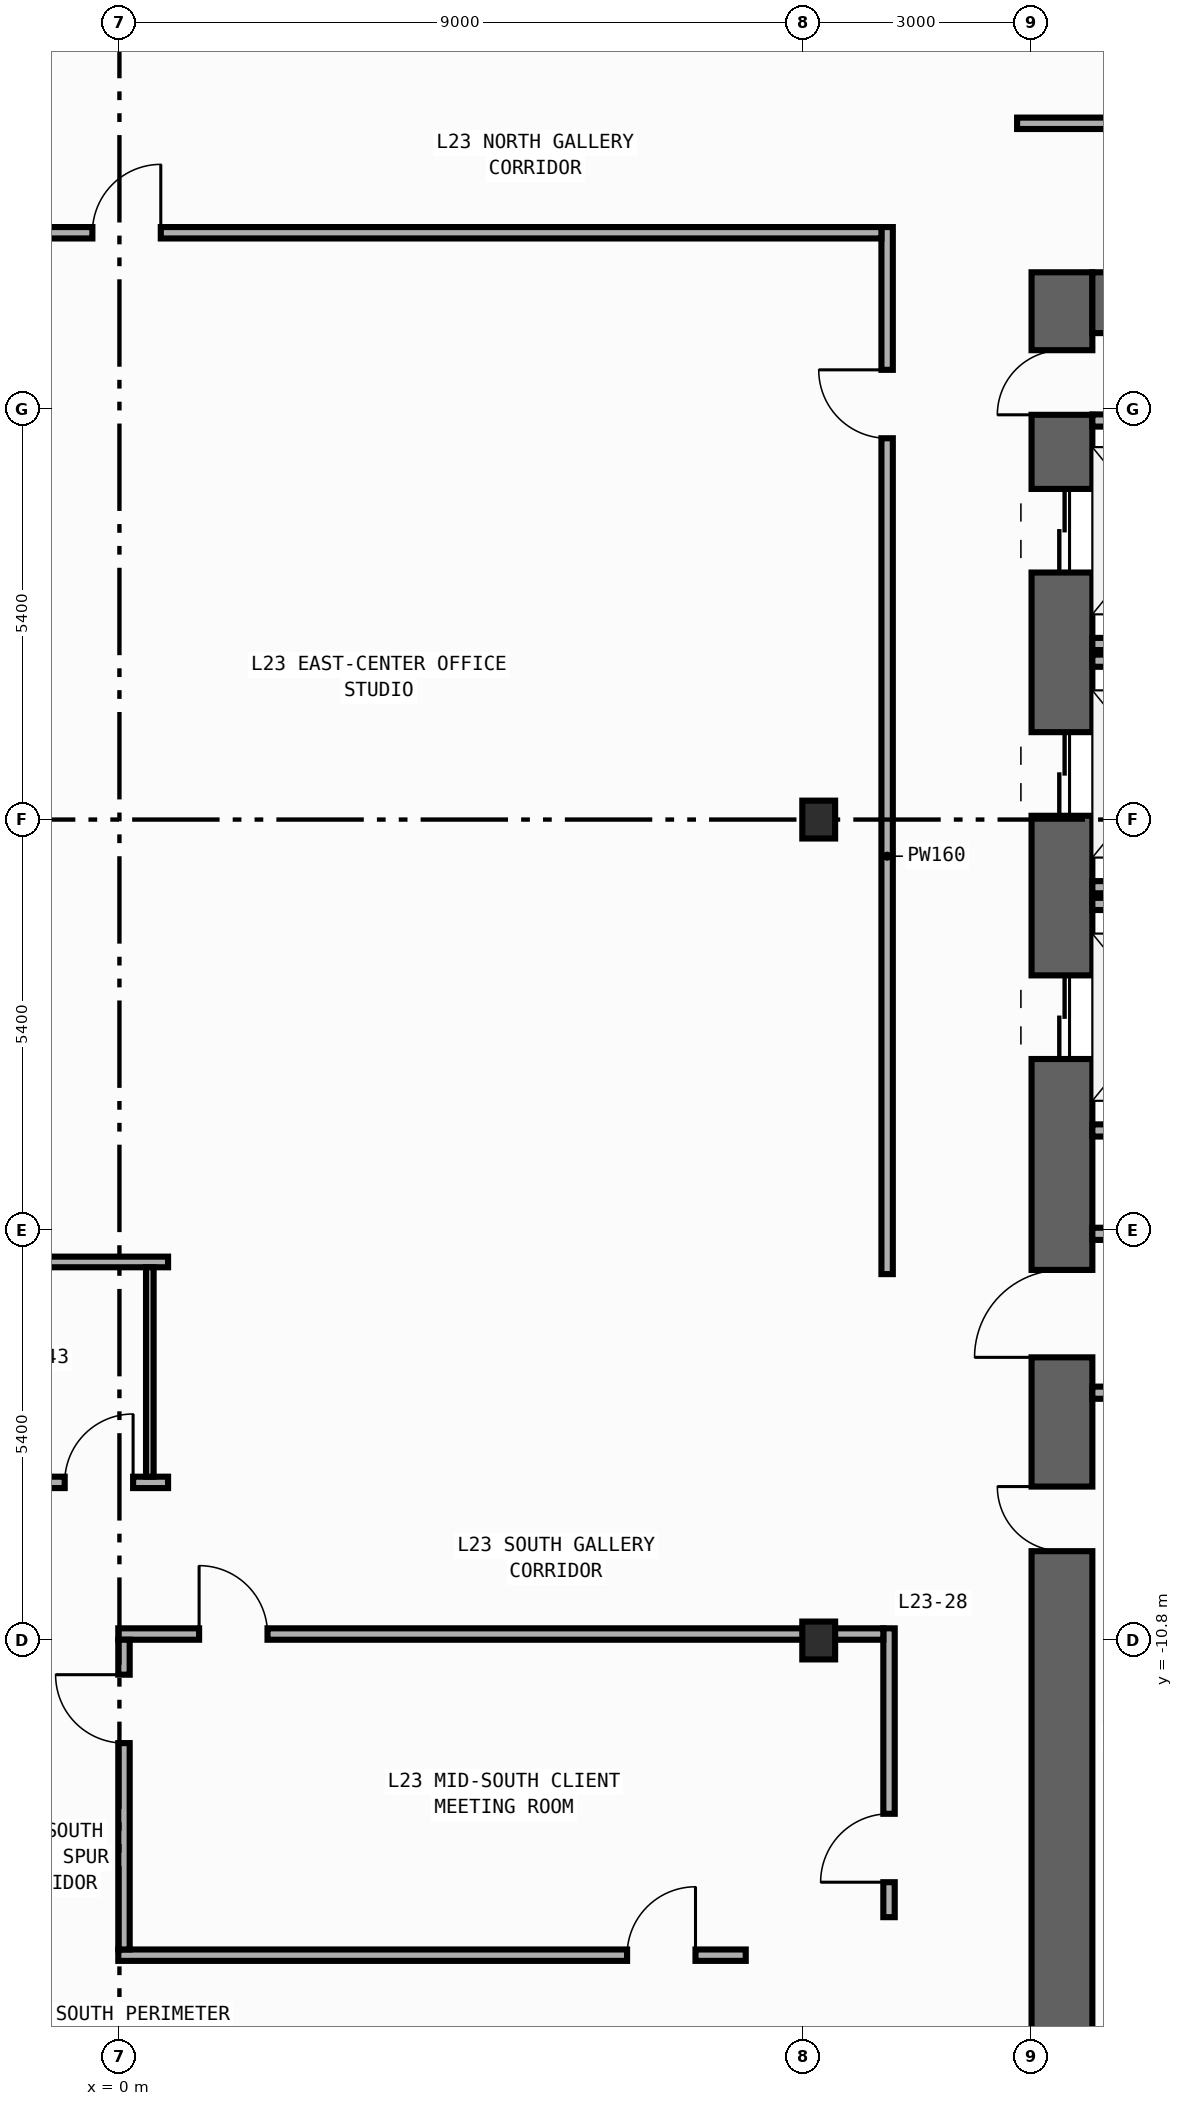
"""IFC4 building model, lengths in metres.
Left out: names, types, materials, properties, quantities, classifications, styles, units other than length and angle.
Written with IfcOpenShell. Run it as: python <this file> out.ifc"""

import sys

from ifc_helpers import new_model, si_unit, direction, frame, frame_2d, origin, origin_2d, place, context, subcontext, project, spatial, rectangle, i_section, extrude, element, fill, save


model = new_model("IFC4")
c1 = context("Model", 3, precision=1e-05, world=origin(), true_north=direction((0.0, 1.0)))
c2 = subcontext(c1, "Body", "Model", "MODEL_VIEW")
j1 = project(units=[si_unit("LENGTHUNIT", "METRE"), si_unit("PLANEANGLEUNIT", "RADIAN")], contexts=[c1])
p1 = place(None, origin())
s1 = spatial("IfcSite", under=j1, at=p1, CompositionType="ELEMENT")
p2 = place(p1, origin())
s2 = spatial("IfcBuilding", under=s1, at=p2, CompositionType="ELEMENT")
p3 = place(p2, frame((0.0, 0.0, 101.6)))
s3 = spatial("IfcBuildingStorey", under=s2, at=p3, CompositionType="ELEMENT", Elevation=101.6)
p4 = place(p3, frame((12.4, -19.8, 0.0), z_axis=(0.0, 0.0, 1.0), x_axis=(0.0, 1.0, 0.0)))
e1 = element("IfcWall", 1, at=p4, inside=s3, PredefinedType="SHEAR", context=c2, shape_type="SweptSolid", body=[
    extrude(rectangle(XDim=27.0, YDim=0.8, at=frame_2d((13.5, 0.0))), origin(), (0.0, 0.0, 1.0), 3.94),
])
p5 = place(p4, frame((23.05, 0.0, 0.0)))
e2 = element("IfcOpeningElement", 2, at=p5, cuts=e1, PredefinedType="OPENING", context=c2, shape_type="SweptSolid", body=[
    extrude(rectangle(XDim=1.1, YDim=2.2, at=frame_2d((0.55, 1.1))), frame((0.0, 0.41, 0.0), z_axis=(0.0, -1.0, 0.0), x_axis=(1.0, 0.0, 0.0)), (0.0, 0.0, 1.0), 0.82),
])
p6 = place(p4, frame((19.85, 0.0, 0.0)))
e3 = element("IfcOpeningElement", 3, at=p6, cuts=e1, PredefinedType="OPENING", context=c2, shape_type="SweptSolid", body=[
    extrude(rectangle(XDim=1.1, YDim=2.2, at=frame_2d((0.55, 1.1))), frame((0.0, 0.41, 0.0), z_axis=(0.0, -1.0, 0.0), x_axis=(1.0, 0.0, 0.0)), (0.0, 0.0, 1.0), 0.82),
])
p7 = place(p4, frame((16.65, 0.0, 0.0)))
e4 = element("IfcOpeningElement", 4, at=p7, cuts=e1, PredefinedType="OPENING", context=c2, shape_type="SweptSolid", body=[
    extrude(rectangle(XDim=1.1, YDim=2.2, at=frame_2d((0.55, 1.1))), frame((0.0, 0.41, 0.0), z_axis=(0.0, -1.0, 0.0), x_axis=(1.0, 0.0, 0.0)), (0.0, 0.0, 1.0), 0.82),
])
p8 = place(p4, frame((10.175, 0.0, 0.0)))
e5 = element("IfcOpeningElement", 5, at=p8, cuts=e1, PredefinedType="OPENING", context=c2, shape_type="SweptSolid", body=[
    extrude(rectangle(XDim=0.85, YDim=2.1, at=frame_2d((0.425, 1.05))), frame((0.0, 0.41, 0.0), z_axis=(0.0, -1.0, 0.0), x_axis=(1.0, 0.0, 0.0)), (0.0, 0.0, 1.0), 0.82),
])
p9 = place(p4, frame((12.725, 0.0, 0.0)))
e6 = element("IfcOpeningElement", 6, at=p9, cuts=e1, PredefinedType="OPENING", context=c2, shape_type="SweptSolid", body=[
    extrude(rectangle(XDim=1.15, YDim=2.2, at=frame_2d((0.575, 1.1))), frame((0.0, 0.41, 0.0), z_axis=(0.0, -1.0, 0.0), x_axis=(1.0, 0.0, 0.0)), (0.0, 0.0, 1.0), 0.82),
])
p10 = place(p4, frame((25.125, 0.0, 0.0)))
e7 = element("IfcOpeningElement", 7, at=p10, cuts=e1, PredefinedType="OPENING", context=c2, shape_type="SweptSolid", body=[
    extrude(rectangle(XDim=0.85, YDim=2.1, at=frame_2d((0.425, 1.05))), frame((0.0, 0.41, 0.0), z_axis=(0.0, -1.0, 0.0), x_axis=(1.0, 0.0, 0.0)), (0.0, 0.0, 1.0), 0.82),
])
p11 = place(p3, frame((12.8, 6.8, 0.0), z_axis=(0.0, 0.0, 1.0), x_axis=(1.0, 0.0, 0.0)))
e8 = element("IfcWall", 8, at=p11, inside=s3, PredefinedType="SHEAR", context=c2, shape_type="SweptSolid", body=[
    extrude(rectangle(XDim=6.8, YDim=0.8, at=frame_2d((3.4, 0.0))), origin(), (0.0, 0.0, 1.0), 3.94),
])
for number, where, z_axis, x_axis in (
    (9, (9.2, -10.8, 0.0), (0.0, 0.0, 1.0), (1.0, 0.0, 0.0)),
    (10, (9.2, 0.0, 0.0), (0.0, 0.0, 1.0), (1.0, 0.0, 0.0)),
):
    element("IfcColumn", number, at=place(p3, frame(where, z_axis=z_axis, x_axis=x_axis)), inside=s3, PredefinedType="COLUMN", context=c2, shape_type="SweptSolid", body=[
        extrude(i_section(OverallWidth=0.432, OverallDepth=0.498, WebThickness=0.045, FlangeThickness=0.07, FilletRadius=0.022, at=origin_2d()), origin(), (0.0, 0.0, 1.0), 4.2),
    ])
for number, where, z_axis, x_axis in (
    (11, (12.8, 2.31, 0.0), (0.0, 0.0, 1.0), (1.0, 0.0, 0.0)),
    (12, (12.8, -0.89, 0.0), (0.0, 0.0, 1.0), (1.0, 0.0, 0.0)),
    (13, (12.8, 2.09, 0.0), (0.0, 0.0, 1.0), (1.0, 0.0, 0.0)),
    (14, (12.8, -4.09, 0.0), (0.0, 0.0, 1.0), (1.0, 0.0, 0.0)),
    (15, (12.8, -1.11, 0.0), (0.0, 0.0, 1.0), (1.0, 0.0, 0.0)),
):
    element("IfcWall", number, at=place(p3, frame(where, z_axis=z_axis, x_axis=x_axis)), inside=s3, PredefinedType="STANDARD", context=c2, shape_type="SweptSolid", body=[
        extrude(rectangle(XDim=2.19, YDim=0.16, at=frame_2d((1.095, 0.0))), origin(), (0.0, 0.0, 1.0), 3.94),
    ])
for number, where, z_axis, x_axis in (
    (16, (12.8, -5.45, 0.0), (0.0, 0.0, 1.0), (1.0, 0.0, 0.0)),
    (17, (12.8, -7.54, 0.0), (0.0, 0.0, 1.0), (1.0, 0.0, 0.0)),
    (18, (12.8, 5.25, 0.0), (0.0, 0.0, 1.0), (1.0, 0.0, 0.0)),
):
    element("IfcWall", number, at=place(p3, frame(where, z_axis=z_axis, x_axis=x_axis)), inside=s3, PredefinedType="STANDARD", context=c2, shape_type="SweptSolid", body=[
        extrude(rectangle(XDim=2.6, YDim=0.16, at=frame_2d((1.3, 0.0))), origin(), (0.0, 0.0, 1.0), 3.94),
    ])
p12 = place(p3, frame((10.1, -5.98, 0.0), z_axis=(0.0, 0.0, 1.0), x_axis=(0.0, 1.0, 0.0)))
e19 = element("IfcWall", 19, at=p12, inside=s3, PredefinedType="PARTITIONING", context=c2, shape_type="SweptSolid", body=[
    extrude(rectangle(XDim=13.775, YDim=0.15, at=frame_2d((6.887, 0.0))), origin(), (0.0, 0.0, 1.0), 3.94),
])
p13 = place(p12, frame((10.997, 0.0, 0.0)))
e20 = element("IfcOpeningElement", 20, at=p13, cuts=e19, PredefinedType="OPENING", context=c2, shape_type="SweptSolid", body=[
    extrude(rectangle(XDim=0.9, YDim=2.15, at=frame_2d((0.45, 1.075))), frame((0.0, 0.085, 0.0), z_axis=(0.0, -1.0, 0.0), x_axis=(1.0, 0.0, 0.0)), (0.0, 0.0, 1.0), 0.17),
])
p14 = place(p3, frame((10.125, -14.44, 0.0), z_axis=(0.0, 0.0, 1.0), x_axis=(0.0, 1.0, 0.0)))
e21 = element("IfcWall", 21, at=p14, inside=s3, PredefinedType="PARTITIONING", context=c2, shape_type="SweptSolid", body=[
    extrude(rectangle(XDim=3.8, YDim=0.15, at=frame_2d((1.9, 0.0))), origin(), (0.0, 0.0, 1.0), 3.94),
])
p15 = place(p14, frame((0.46, 0.0, 0.0)))
e22 = element("IfcOpeningElement", 22, at=p15, cuts=e21, PredefinedType="OPENING", context=c2, shape_type="SweptSolid", body=[
    extrude(rectangle(XDim=0.9, YDim=2.15, at=frame_2d((0.45, 1.075))), frame((0.0, 0.085, 0.0), z_axis=(0.0, -1.0, 0.0), x_axis=(1.0, 0.0, 0.0)), (0.0, 0.0, 1.0), 0.17),
])
p16 = place(p3, frame((-2.62, 7.72, 0.0), z_axis=(0.0, 0.0, 1.0), x_axis=(1.0, 0.0, 0.0)))
e23 = element("IfcWall", 23, at=p16, inside=s3, PredefinedType="PARTITIONING", context=c2, shape_type="SweptSolid", body=[
    extrude(rectangle(XDim=12.645, YDim=0.15, at=frame_2d((6.323, 0.0))), origin(), (0.0, 0.0, 1.0), 3.94),
])
p17 = place(p16, frame((2.264, 0.0, 0.0)))
e24 = element("IfcOpeningElement", 24, at=p17, cuts=e23, PredefinedType="OPENING", context=c2, shape_type="SweptSolid", body=[
    extrude(rectangle(XDim=0.9, YDim=2.15, at=frame_2d((0.45, 1.075))), frame((0.0, 0.085, 0.0), z_axis=(0.0, -1.0, 0.0), x_axis=(1.0, 0.0, 0.0)), (0.0, 0.0, 1.0), 0.17),
])
p18 = place(p3, frame((-2.62, -8.72, 0.0), z_axis=(0.0, 0.0, 1.0), x_axis=(1.0, 0.0, 0.0)))
e25 = element("IfcWall", 25, at=p18, inside=s3, PredefinedType="PARTITIONING", context=c2, shape_type="SweptSolid", body=[
    extrude(rectangle(XDim=3.26, YDim=0.15, at=frame_2d((1.63, 0.0))), origin(), (0.0, 0.0, 1.0), 3.94),
])
p19 = place(p18, frame((1.9, 0.0, 0.0)))
e26 = element("IfcOpeningElement", 26, at=p19, cuts=e25, PredefinedType="OPENING", context=c2, shape_type="SweptSolid", body=[
    extrude(rectangle(XDim=0.9, YDim=2.15, at=frame_2d((0.45, 1.075))), frame((0.0, 0.085, 0.0), z_axis=(0.0, -1.0, 0.0), x_axis=(1.0, 0.0, 0.0)), (0.0, 0.0, 1.0), 0.17),
])
p20 = place(p3, frame((-0.015, -10.715, 0.0), z_axis=(0.0, 0.0, 1.0), x_axis=(1.0, 0.0, 0.0)))
e27 = element("IfcWall", 27, at=p20, inside=s3, PredefinedType="PARTITIONING", context=c2, shape_type="SweptSolid", body=[
    extrude(rectangle(XDim=10.065, YDim=0.15, at=frame_2d((5.032, 0.0))), origin(), (0.0, 0.0, 1.0), 3.24),
])
p21 = place(p20, frame((1.063, 0.0, 0.0)))
e28 = element("IfcOpeningElement", 28, at=p21, cuts=e27, PredefinedType="OPENING", context=c2, shape_type="SweptSolid", body=[
    extrude(rectangle(XDim=0.9, YDim=2.15, at=frame_2d((0.45, 1.075))), frame((0.0, 0.085, 0.0), z_axis=(0.0, -1.0, 0.0), x_axis=(1.0, 0.0, 0.0)), (0.0, 0.0, 1.0), 0.17),
])
p22 = place(p3, frame((11.81, 9.16, 0.0), z_axis=(0.0, 0.0, 1.0), x_axis=(1.0, 0.0, 0.0)))
e29 = element("IfcWall", 29, at=p22, inside=s3, PredefinedType="PARTITIONING", context=c2, shape_type="SweptSolid", body=[
    extrude(rectangle(XDim=8.83, YDim=0.15, at=frame_2d((4.415, 0.0))), origin(), (0.0, 0.0, 1.0), 3.94),
])
p23 = place(p22, frame((5.067, 0.0, 0.0)))
e30 = element("IfcOpeningElement", 30, at=p23, cuts=e29, PredefinedType="OPENING", context=c2, shape_type="SweptSolid", body=[
    extrude(rectangle(XDim=0.9, YDim=2.15, at=frame_2d((0.45, 1.075))), frame((0.0, 0.085, 0.0), z_axis=(0.0, -1.0, 0.0), x_axis=(1.0, 0.0, 0.0)), (0.0, 0.0, 1.0), 0.17),
])
p24 = place(p3, frame((-0.015, -14.94, 0.0), z_axis=(0.0, 0.0, 1.0), x_axis=(1.0, 0.0, 0.0)))
e31 = element("IfcWall", 31, at=p24, inside=s3, PredefinedType="PARTITIONING", context=c2, shape_type="SweptSolid", body=[
    extrude(rectangle(XDim=8.255, YDim=0.15, at=frame_2d((4.127, 0.0))), origin(), (0.0, 0.0, 1.0), 3.94),
])
p25 = place(p24, frame((6.694, 0.0, 0.0)))
e32 = element("IfcOpeningElement", 32, at=p25, cuts=e31, PredefinedType="OPENING", context=c2, shape_type="SweptSolid", body=[
    extrude(rectangle(XDim=0.9, YDim=2.15, at=frame_2d((0.45, 1.075))), frame((0.0, 0.085, 0.0), z_axis=(0.0, -1.0, 0.0), x_axis=(1.0, 0.0, 0.0)), (0.0, 0.0, 1.0), 0.17),
])
p26 = place(p3, frame((0.06, -14.865, 0.0), z_axis=(0.0, 0.0, 1.0), x_axis=(0.0, 1.0, 0.0)))
e33 = element("IfcWall", 33, at=p26, inside=s3, PredefinedType="PARTITIONING", context=c2, shape_type="SweptSolid", body=[
    extrude(rectangle(XDim=4.075, YDim=0.15, at=frame_2d((2.038, 0.0))), origin(), (0.0, 0.0, 1.0), 3.94),
])
p27 = place(p26, frame((2.715, 0.0, 0.0)))
e34 = element("IfcOpeningElement", 34, at=p27, cuts=e33, PredefinedType="OPENING", context=c2, shape_type="SweptSolid", body=[
    extrude(rectangle(XDim=0.9, YDim=2.15, at=frame_2d((0.45, 1.075))), frame((0.0, 0.085, 0.0), z_axis=(0.0, -1.0, 0.0), x_axis=(1.0, 0.0, 0.0)), (0.0, 0.0, 1.0), 0.17),
])
p28 = place(p3, frame((-2.47, -5.82, 0.0), z_axis=(0.0, 0.0, 1.0), x_axis=(1.0, 0.0, 0.0)))
e35 = element("IfcWall", 35, at=p28, inside=s3, PredefinedType="PARTITIONING", context=c2, shape_type="SweptSolid", body=[
    extrude(rectangle(XDim=3.11, YDim=0.14, at=frame_2d((1.555, 0.0))), origin(), (0.0, 0.0, 1.0), 3.94),
])
p29 = place(p3, frame((0.4, -5.89, 0.0), z_axis=(0.0, 0.0, 1.0), x_axis=(0.0, -1.0, 0.0)))
e36 = element("IfcWall", 36, at=p29, inside=s3, PredefinedType="PARTITIONING", context=c2, shape_type="SweptSolid", body=[
    extrude(rectangle(XDim=2.755, YDim=0.1, at=frame_2d((1.377, 0.0))), origin(), (0.0, 0.0, 1.0), 3.94),
])
p30 = place(p5, origin())
e37 = element("IfcDoor", 37, at=p30, inside=s3, OperationType="DOUBLE_DOOR_SLIDING", PredefinedType="DOOR", context=c2, shape_type="SweptSolid", body=[
    extrude(rectangle(XDim=1.1, YDim=2.2, at=frame_2d((0.55, 1.1))), frame((0.0, 0.025, 0.0), z_axis=(0.0, -1.0, 0.0), x_axis=(1.0, 0.0, 0.0)), (0.0, 0.0, 1.0), 0.05),
])
fill(e2, e37)
p31 = place(p6, origin())
e38 = element("IfcDoor", 38, at=p31, inside=s3, OperationType="DOUBLE_DOOR_SLIDING", PredefinedType="DOOR", context=c2, shape_type="SweptSolid", body=[
    extrude(rectangle(XDim=1.1, YDim=2.2, at=frame_2d((0.55, 1.1))), frame((0.0, 0.025, 0.0), z_axis=(0.0, -1.0, 0.0), x_axis=(1.0, 0.0, 0.0)), (0.0, 0.0, 1.0), 0.05),
])
fill(e3, e38)
p32 = place(p7, origin())
e39 = element("IfcDoor", 39, at=p32, inside=s3, OperationType="DOUBLE_DOOR_SLIDING", PredefinedType="DOOR", context=c2, shape_type="SweptSolid", body=[
    extrude(rectangle(XDim=1.1, YDim=2.2, at=frame_2d((0.55, 1.1))), frame((0.0, 0.025, 0.0), z_axis=(0.0, -1.0, 0.0), x_axis=(1.0, 0.0, 0.0)), (0.0, 0.0, 1.0), 0.05),
])
fill(e4, e39)
p33 = place(p8, origin())
e40 = element("IfcDoor", 40, at=p33, inside=s3, OperationType="SINGLE_SWING_RIGHT", PredefinedType="DOOR", context=c2, shape_type="SweptSolid", body=[
    extrude(rectangle(XDim=0.85, YDim=2.1, at=frame_2d((0.425, 1.05))), frame((0.0, 0.025, 0.0), z_axis=(0.0, -1.0, 0.0), x_axis=(1.0, 0.0, 0.0)), (0.0, 0.0, 1.0), 0.05),
])
fill(e5, e40)
p34 = place(p9, origin())
e41 = element("IfcDoor", 41, at=p34, inside=s3, OperationType="SINGLE_SWING_LEFT", PredefinedType="DOOR", context=c2, shape_type="SweptSolid", body=[
    extrude(rectangle(XDim=1.15, YDim=2.2, at=frame_2d((0.575, 1.1))), frame((0.0, 0.025, 0.0), z_axis=(0.0, -1.0, 0.0), x_axis=(1.0, 0.0, 0.0)), (0.0, 0.0, 1.0), 0.05),
])
fill(e6, e41)
p35 = place(p10, origin())
e42 = element("IfcDoor", 42, at=p35, inside=s3, OperationType="SINGLE_SWING_LEFT", PredefinedType="DOOR", context=c2, shape_type="SweptSolid", body=[
    extrude(rectangle(XDim=0.85, YDim=2.1, at=frame_2d((0.425, 1.05))), frame((0.0, 0.025, 0.0), z_axis=(0.0, -1.0, 0.0), x_axis=(1.0, 0.0, 0.0)), (0.0, 0.0, 1.0), 0.05),
])
fill(e7, e42)
p36 = place(p13, origin())
e43 = element("IfcDoor", 43, at=p36, inside=s3, OperationType="SINGLE_SWING_RIGHT", PredefinedType="DOOR", context=c2, shape_type="SweptSolid", body=[
    extrude(rectangle(XDim=0.9, YDim=2.15, at=frame_2d((0.45, 1.075))), frame((0.0, 0.025, 0.0), z_axis=(0.0, -1.0, 0.0), x_axis=(1.0, 0.0, 0.0)), (0.0, 0.0, 1.0), 0.05),
])
fill(e20, e43)
p37 = place(p15, origin())
e44 = element("IfcDoor", 44, at=p37, inside=s3, OperationType="SINGLE_SWING_LEFT", PredefinedType="DOOR", context=c2, shape_type="SweptSolid", body=[
    extrude(rectangle(XDim=0.9, YDim=2.15, at=frame_2d((0.45, 1.075))), frame((0.0, 0.025, 0.0), z_axis=(0.0, -1.0, 0.0), x_axis=(1.0, 0.0, 0.0)), (0.0, 0.0, 1.0), 0.05),
])
fill(e22, e44)
p38 = place(p17, origin())
e45 = element("IfcDoor", 45, at=p38, inside=s3, OperationType="SINGLE_SWING_RIGHT", PredefinedType="DOOR", context=c2, shape_type="SweptSolid", body=[
    extrude(rectangle(XDim=0.9, YDim=2.15, at=frame_2d((0.45, 1.075))), frame((0.0, 0.025, 0.0), z_axis=(0.0, -1.0, 0.0), x_axis=(1.0, 0.0, 0.0)), (0.0, 0.0, 1.0), 0.05),
])
fill(e24, e45)
p39 = place(p19, origin())
e46 = element("IfcDoor", 46, at=p39, inside=s3, OperationType="SINGLE_SWING_RIGHT", PredefinedType="DOOR", context=c2, shape_type="SweptSolid", body=[
    extrude(rectangle(XDim=0.9, YDim=2.15, at=frame_2d((0.45, 1.075))), frame((0.0, 0.025, 0.0), z_axis=(0.0, -1.0, 0.0), x_axis=(1.0, 0.0, 0.0)), (0.0, 0.0, 1.0), 0.05),
])
fill(e26, e46)
p40 = place(p21, origin())
e47 = element("IfcDoor", 47, at=p40, inside=s3, OperationType="SINGLE_SWING_LEFT", PredefinedType="DOOR", context=c2, shape_type="SweptSolid", body=[
    extrude(rectangle(XDim=0.9, YDim=2.15, at=frame_2d((0.45, 1.075))), frame((0.0, 0.025, 0.0), z_axis=(0.0, -1.0, 0.0), x_axis=(1.0, 0.0, 0.0)), (0.0, 0.0, 1.0), 0.05),
])
fill(e28, e47)
p41 = place(p25, origin())
e48 = element("IfcDoor", 48, at=p41, inside=s3, OperationType="SINGLE_SWING_RIGHT", PredefinedType="DOOR", context=c2, shape_type="SweptSolid", body=[
    extrude(rectangle(XDim=0.9, YDim=2.15, at=frame_2d((0.45, 1.075))), frame((0.0, 0.025, 0.0), z_axis=(0.0, -1.0, 0.0), x_axis=(1.0, 0.0, 0.0)), (0.0, 0.0, 1.0), 0.05),
])
fill(e32, e48)
p42 = place(p27, origin())
e49 = element("IfcDoor", 49, at=p42, inside=s3, OperationType="SINGLE_SWING_RIGHT", PredefinedType="DOOR", context=c2, shape_type="SweptSolid", body=[
    extrude(rectangle(XDim=0.9, YDim=2.15, at=frame_2d((0.45, 1.075))), frame((0.0, 0.025, 0.0), z_axis=(0.0, -1.0, 0.0), x_axis=(1.0, 0.0, 0.0)), (0.0, 0.0, 1.0), 0.05),
])
fill(e34, e49)
save(model, sys.argv[1])
